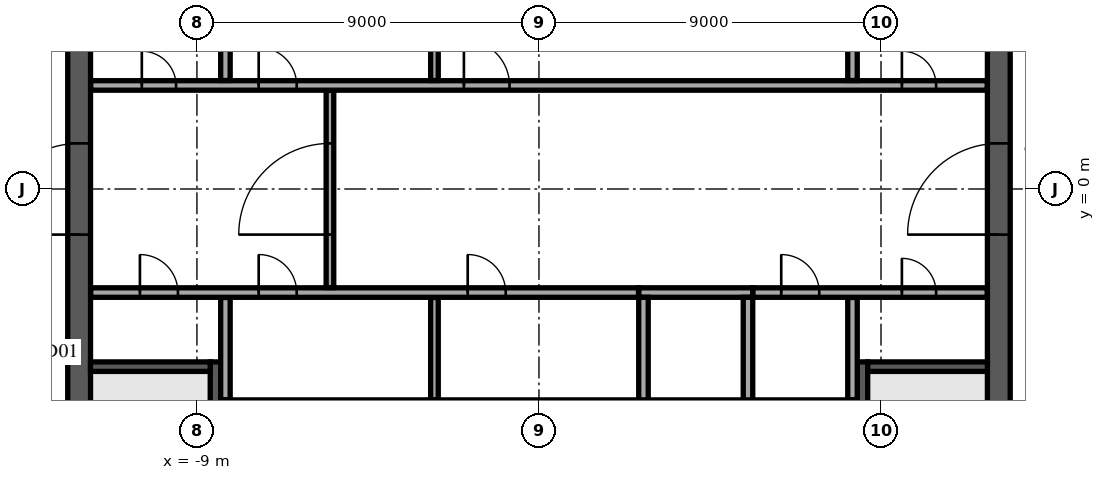
"""IFC4 building model, lengths in metres.
Left out: names, types, materials, properties, quantities, classifications, styles, units other than length and angle.
Written with IfcOpenShell. Run it as: python <this file> out.ifc"""

import sys

from ifc_helpers import new_model, si_unit, direction, frame, frame_2d, origin, place, context, subcontext, project, spatial, rectangle, extrude, element, fill, save


model = new_model("IFC4")
c1 = context("Model", 3, precision=1e-05, world=origin(), true_north=direction((0.0, 1.0)))
c2 = subcontext(c1, "Body", "Model", "MODEL_VIEW")
j1 = project(units=[si_unit("LENGTHUNIT", "METRE"), si_unit("PLANEANGLEUNIT", "RADIAN")], contexts=[c1])
p1 = place(None, origin())
s1 = spatial("IfcSite", under=j1, at=p1, CompositionType="ELEMENT")
p2 = place(p1, origin())
s2 = spatial("IfcBuilding", under=s1, at=p2, CompositionType="ELEMENT")
p3 = place(p2, frame((0.0, 0.0, 300.5)))
s3 = spatial("IfcBuildingStorey", under=s2, at=p3, CompositionType="ELEMENT", Elevation=300.5)
p4 = place(p3, frame((12.1, -11.8, 0.0), z_axis=(0.0, 0.0, 1.0), x_axis=(0.0, 1.0, 0.0)))
e1 = element("IfcWall", 1, at=p4, inside=s3, PredefinedType="SHEAR", context=c2, shape_type="SweptSolid", body=[
    extrude(rectangle(XDim=23.6, YDim=0.6, at=frame_2d((11.8, 0.0))), origin(), (0.0, 0.0, 1.0), 3.65),
])
p5 = place(p4, frame((10.6, 0.0, 0.0)))
e2 = element("IfcOpeningElement", 2, at=p5, cuts=e1, PredefinedType="OPENING", context=c2, shape_type="SweptSolid", body=[
    extrude(rectangle(XDim=2.4, YDim=2.4, at=frame_2d((1.2, 1.2))), frame((0.0, 0.31, 0.0), z_axis=(0.0, -1.0, 0.0), x_axis=(1.0, 0.0, 0.0)), (0.0, 0.0, 1.0), 0.62),
])
p6 = place(p3, frame((-12.1, -11.8, 0.0), z_axis=(0.0, 0.0, 1.0), x_axis=(0.0, 1.0, 0.0)))
e3 = element("IfcWall", 3, at=p6, inside=s3, PredefinedType="SHEAR", context=c2, shape_type="SweptSolid", body=[
    extrude(rectangle(XDim=23.6, YDim=0.6, at=frame_2d((11.8, 0.0))), origin(), (0.0, 0.0, 1.0), 3.65),
])
p7 = place(p6, frame((10.6, 0.0, 0.0)))
e4 = element("IfcOpeningElement", 4, at=p7, cuts=e3, PredefinedType="OPENING", context=c2, shape_type="SweptSolid", body=[
    extrude(rectangle(XDim=2.4, YDim=2.4, at=frame_2d((1.2, 1.2))), frame((0.0, 0.31, 0.0), z_axis=(0.0, -1.0, 0.0), x_axis=(1.0, 0.0, 0.0)), (0.0, 0.0, 1.0), 0.62),
])
p8 = place(p3, frame((-2.875, -5.7, 0.0), z_axis=(0.0, 0.0, 1.0), x_axis=(1.0, 0.0, 0.0)))
e5 = element("IfcWall", 5, at=p8, inside=s3, PredefinedType="SOLIDWALL", context=c2, shape_type="SweptSolid", body=[
    extrude(rectangle(XDim=11.25, YDim=0.3, at=frame_2d((5.625, 0.0))), origin(), (0.0, 0.0, 1.0), 3.65),
])
p9 = place(p3, frame((2.625, -2.725, 0.0), z_axis=(0.0, 0.0, 1.0), x_axis=(1.0, 0.0, 0.0)))
e6 = element("IfcWall", 6, at=p9, inside=s3, PredefinedType="SOLIDWALL", context=c2, shape_type="SweptSolid", body=[
    extrude(rectangle(XDim=3.0, YDim=0.25, at=frame_2d((1.5, 0.0))), origin(), (0.0, 0.0, 1.0), 3.65),
])
for number, where, z_axis, x_axis in (
    (7, (2.75, -5.55, 0.0), (0.0, 0.0, 1.0), (0.0, 1.0, 0.0)),
    (8, (5.5, -5.55, 0.0), (0.0, 0.0, 1.0), (0.0, 1.0, 0.0)),
):
    element("IfcWall", number, at=place(p3, frame(where, z_axis=z_axis, x_axis=x_axis)), inside=s3, PredefinedType="SOLIDWALL", context=c2, shape_type="SweptSolid", body=[
        extrude(rectangle(XDim=2.7, YDim=0.25, at=frame_2d((1.35, 0.0))), origin(), (0.0, 0.0, 1.0), 3.65),
    ])
p10 = place(p3, frame((-8.512, -4.55, 0.0), z_axis=(0.0, 0.0, 1.0), x_axis=(0.0, -1.0, 0.0)))
e9 = element("IfcWall", 9, at=p10, inside=s3, PredefinedType="SOLIDWALL", context=c2, shape_type="SweptSolid", body=[
    extrude(rectangle(XDim=7.25, YDim=0.275, at=frame_2d((3.625, 0.0))), origin(), (0.0, 0.0, 1.0), 3.65),
])
p11 = place(p10, frame((6.0, 0.0, 0.0)))
e10 = element("IfcOpeningElement", 10, at=p11, cuts=e9, PredefinedType="OPENING", context=c2, shape_type="SweptSolid", body=[
    extrude(rectangle(XDim=1.0, YDim=2.1, at=frame_2d((0.5, 1.05))), frame((0.0, 0.147, 0.0), z_axis=(0.0, -1.0, 0.0), x_axis=(1.0, 0.0, 0.0)), (0.0, 0.0, 1.0), 0.295),
])
p12 = place(p3, frame((-8.65, -4.675, 0.0), z_axis=(0.0, 0.0, 1.0), x_axis=(-1.0, 0.0, 0.0)))
e11 = element("IfcWall", 11, at=p12, inside=s3, PredefinedType="SOLIDWALL", context=c2, shape_type="SweptSolid", body=[
    extrude(rectangle(XDim=3.15, YDim=0.25, at=frame_2d((1.575, 0.0))), origin(), (0.0, 0.0, 1.0), 3.65),
])
p13 = place(p3, frame((8.512, -4.55, 0.0), z_axis=(0.0, 0.0, 1.0), x_axis=(0.0, -1.0, 0.0)))
e12 = element("IfcWall", 12, at=p13, inside=s3, PredefinedType="SOLIDWALL", context=c2, shape_type="SweptSolid", body=[
    extrude(rectangle(XDim=7.25, YDim=0.275, at=frame_2d((3.625, 0.0))), origin(), (0.0, 0.0, 1.0), 3.65),
])
p14 = place(p13, frame((6.0, 0.0, 0.0)))
e13 = element("IfcOpeningElement", 13, at=p14, cuts=e12, PredefinedType="OPENING", context=c2, shape_type="SweptSolid", body=[
    extrude(rectangle(XDim=1.0, YDim=2.1, at=frame_2d((0.5, 1.05))), frame((0.0, 0.147, 0.0), z_axis=(0.0, -1.0, 0.0), x_axis=(1.0, 0.0, 0.0)), (0.0, 0.0, 1.0), 0.295),
])
p15 = place(p3, frame((8.65, -4.675, 0.0), z_axis=(0.0, 0.0, 1.0), x_axis=(1.0, 0.0, 0.0)))
e14 = element("IfcWall", 14, at=p15, inside=s3, PredefinedType="SOLIDWALL", context=c2, shape_type="SweptSolid", body=[
    extrude(rectangle(XDim=3.15, YDim=0.25, at=frame_2d((1.575, 0.0))), origin(), (0.0, 0.0, 1.0), 3.65),
])
p16 = place(p3, frame((-8.35, -5.7, 0.0), z_axis=(0.0, 0.0, 1.0), x_axis=(1.0, 0.0, 0.0)))
e15 = element("IfcWall", 15, at=p16, inside=s3, PredefinedType="PARTITIONING", context=c2, shape_type="SweptSolid", body=[
    extrude(rectangle(XDim=5.47, YDim=0.3, at=frame_2d((2.735, 0.0))), origin(), (0.0, 0.0, 1.0), 3.65),
])
p17 = place(p3, frame((-8.25, -5.545, 0.0), z_axis=(0.0, 0.0, 1.0), x_axis=(0.0, 1.0, 0.0)))
e16 = element("IfcWall", 16, at=p17, inside=s3, PredefinedType="PARTITIONING", context=c2, shape_type="SweptSolid", body=[
    extrude(rectangle(XDim=2.69, YDim=0.25, at=frame_2d((1.345, 0.0))), origin(), (0.0, 0.0, 1.0), 3.65),
])
p18 = place(p3, frame((-2.75, -5.545, 0.0), z_axis=(0.0, 0.0, 1.0), x_axis=(0.0, 1.0, 0.0)))
e17 = element("IfcWall", 17, at=p18, inside=s3, PredefinedType="PARTITIONING", context=c2, shape_type="SweptSolid", body=[
    extrude(rectangle(XDim=2.69, YDim=0.2, at=frame_2d((1.345, 0.0))), origin(), (0.0, 0.0, 1.0), 3.65),
])
p19 = place(p3, frame((8.25, -5.545, 0.0), z_axis=(0.0, 0.0, 1.0), x_axis=(0.0, 1.0, 0.0)))
e18 = element("IfcWall", 18, at=p19, inside=s3, PredefinedType="PARTITIONING", context=c2, shape_type="SweptSolid", body=[
    extrude(rectangle(XDim=2.69, YDim=0.25, at=frame_2d((1.345, 0.0))), origin(), (0.0, 0.0, 1.0), 3.65),
])
p20 = place(p3, frame((-11.795, -2.725, 0.0), z_axis=(0.0, 0.0, 1.0), x_axis=(1.0, 0.0, 0.0)))
e19 = element("IfcWall", 19, at=p20, inside=s3, PredefinedType="PARTITIONING", context=c2, shape_type="SweptSolid", body=[
    extrude(rectangle(XDim=14.415, YDim=0.25, at=frame_2d((7.208, 0.0))), origin(), (0.0, 0.0, 1.0), 3.65),
])
p21 = place(p20, frame((1.295, 0.0, 0.0)))
e20 = element("IfcOpeningElement", 20, at=p21, cuts=e19, PredefinedType="OPENING", context=c2, shape_type="SweptSolid", body=[
    extrude(rectangle(XDim=1.0, YDim=2.1, at=frame_2d((0.5, 1.05))), frame((0.0, 0.135, 0.0), z_axis=(0.0, -1.0, 0.0), x_axis=(1.0, 0.0, 0.0)), (0.0, 0.0, 1.0), 0.27),
])
p22 = place(p20, frame((4.42, 0.0, 0.0)))
e21 = element("IfcOpeningElement", 21, at=p22, cuts=e19, PredefinedType="OPENING", context=c2, shape_type="SweptSolid", body=[
    extrude(rectangle(XDim=1.0, YDim=2.1, at=frame_2d((0.5, 1.05))), frame((0.0, 0.135, 0.0), z_axis=(0.0, -1.0, 0.0), x_axis=(1.0, 0.0, 0.0)), (0.0, 0.0, 1.0), 0.27),
])
p23 = place(p20, frame((9.92, 0.0, 0.0)))
e22 = element("IfcOpeningElement", 22, at=p23, cuts=e19, PredefinedType="OPENING", context=c2, shape_type="SweptSolid", body=[
    extrude(rectangle(XDim=1.0, YDim=2.1, at=frame_2d((0.5, 1.05))), frame((0.0, 0.135, 0.0), z_axis=(0.0, -1.0, 0.0), x_axis=(1.0, 0.0, 0.0)), (0.0, 0.0, 1.0), 0.27),
])
p24 = place(p3, frame((5.63, -2.725, 0.0), z_axis=(0.0, 0.0, 1.0), x_axis=(1.0, 0.0, 0.0)))
e23 = element("IfcWall", 23, at=p24, inside=s3, PredefinedType="PARTITIONING", context=c2, shape_type="SweptSolid", body=[
    extrude(rectangle(XDim=6.165, YDim=0.25, at=frame_2d((3.083, 0.0))), origin(), (0.0, 0.0, 1.0), 3.65),
])
p25 = place(p24, frame((0.745, 0.0, 0.0)))
e24 = element("IfcOpeningElement", 24, at=p25, cuts=e23, PredefinedType="OPENING", context=c2, shape_type="SweptSolid", body=[
    extrude(rectangle(XDim=1.0, YDim=2.1, at=frame_2d((0.5, 1.05))), frame((0.0, 0.135, 0.0), z_axis=(0.0, -1.0, 0.0), x_axis=(1.0, 0.0, 0.0)), (0.0, 0.0, 1.0), 0.27),
])
p26 = place(p24, frame((3.92, 0.0, 0.0)))
e25 = element("IfcOpeningElement", 25, at=p26, cuts=e23, PredefinedType="OPENING", context=c2, shape_type="SweptSolid", body=[
    extrude(rectangle(XDim=0.9, YDim=2.1, at=frame_2d((0.45, 1.05))), frame((0.0, 0.135, 0.0), z_axis=(0.0, -1.0, 0.0), x_axis=(1.0, 0.0, 0.0)), (0.0, 0.0, 1.0), 0.27),
])
p27 = place(p3, frame((-5.5, -2.595, 0.0), z_axis=(0.0, 0.0, 1.0), x_axis=(0.0, 1.0, 0.0)))
e26 = element("IfcWall", 26, at=p27, inside=s3, PredefinedType="PARTITIONING", context=c2, shape_type="SweptSolid", body=[
    extrude(rectangle(XDim=5.19, YDim=0.2, at=frame_2d((2.595, 0.0))), origin(), (0.0, 0.0, 1.0), 3.65),
])
p28 = place(p27, frame((1.395, 0.0, 0.0)))
e27 = element("IfcOpeningElement", 27, at=p28, cuts=e26, PredefinedType="OPENING", context=c2, shape_type="SweptSolid", body=[
    extrude(rectangle(XDim=2.4, YDim=2.4, at=frame_2d((1.2, 1.2))), frame((0.0, 0.11, 0.0), z_axis=(0.0, -1.0, 0.0), x_axis=(1.0, 0.0, 0.0)), (0.0, 0.0, 1.0), 0.22),
])
p29 = place(p3, frame((-11.795, 2.725, 0.0), z_axis=(0.0, 0.0, 1.0), x_axis=(1.0, 0.0, 0.0)))
e28 = element("IfcWall", 28, at=p29, inside=s3, PredefinedType="PARTITIONING", context=c2, shape_type="SweptSolid", body=[
    extrude(rectangle(XDim=23.59, YDim=0.25, at=frame_2d((11.795, 0.0))), origin(), (0.0, 0.0, 1.0), 3.65),
])
p30 = place(p29, frame((21.345, 0.0, 0.0)))
e29 = element("IfcOpeningElement", 29, at=p30, cuts=e28, PredefinedType="OPENING", context=c2, shape_type="SweptSolid", body=[
    extrude(rectangle(XDim=0.9, YDim=2.1, at=frame_2d((0.45, 1.05))), frame((0.0, 0.135, 0.0), z_axis=(0.0, -1.0, 0.0), x_axis=(1.0, 0.0, 0.0)), (0.0, 0.0, 1.0), 0.27),
])
p31 = place(p29, frame((1.345, 0.0, 0.0)))
e30 = element("IfcOpeningElement", 30, at=p31, cuts=e28, PredefinedType="OPENING", context=c2, shape_type="SweptSolid", body=[
    extrude(rectangle(XDim=0.9, YDim=2.1, at=frame_2d((0.45, 1.05))), frame((0.0, 0.135, 0.0), z_axis=(0.0, -1.0, 0.0), x_axis=(1.0, 0.0, 0.0)), (0.0, 0.0, 1.0), 0.27),
])
p32 = place(p29, frame((4.42, 0.0, 0.0)))
e31 = element("IfcOpeningElement", 31, at=p32, cuts=e28, PredefinedType="OPENING", context=c2, shape_type="SweptSolid", body=[
    extrude(rectangle(XDim=1.0, YDim=2.1, at=frame_2d((0.5, 1.05))), frame((0.0, 0.135, 0.0), z_axis=(0.0, -1.0, 0.0), x_axis=(1.0, 0.0, 0.0)), (0.0, 0.0, 1.0), 0.27),
])
p33 = place(p29, frame((9.82, 0.0, 0.0)))
e32 = element("IfcOpeningElement", 32, at=p33, cuts=e28, PredefinedType="OPENING", context=c2, shape_type="SweptSolid", body=[
    extrude(rectangle(XDim=1.2, YDim=2.1, at=frame_2d((0.6, 1.05))), frame((0.0, 0.135, 0.0), z_axis=(0.0, -1.0, 0.0), x_axis=(1.0, 0.0, 0.0)), (0.0, 0.0, 1.0), 0.27),
])
p34 = place(p3, frame((-8.25, 2.855, 0.0), z_axis=(0.0, 0.0, 1.0), x_axis=(0.0, 1.0, 0.0)))
e33 = element("IfcWall", 33, at=p34, inside=s3, PredefinedType="PARTITIONING", context=c2, shape_type="SweptSolid", body=[
    extrude(rectangle(XDim=1.715, YDim=0.25, at=frame_2d((0.857, 0.0))), origin(), (0.0, 0.0, 1.0), 3.65),
])
p35 = place(p3, frame((-2.75, 2.855, 0.0), z_axis=(0.0, 0.0, 1.0), x_axis=(0.0, 1.0, 0.0)))
e34 = element("IfcWall", 34, at=p35, inside=s3, PredefinedType="PARTITIONING", context=c2, shape_type="SweptSolid", body=[
    extrude(rectangle(XDim=2.69, YDim=0.2, at=frame_2d((1.345, 0.0))), origin(), (0.0, 0.0, 1.0), 3.65),
])
p36 = place(p3, frame((8.25, 2.855, 0.0), z_axis=(0.0, 0.0, 1.0), x_axis=(0.0, 1.0, 0.0)))
e35 = element("IfcWall", 35, at=p36, inside=s3, PredefinedType="PARTITIONING", context=c2, shape_type="SweptSolid", body=[
    extrude(rectangle(XDim=2.69, YDim=0.25, at=frame_2d((1.345, 0.0))), origin(), (0.0, 0.0, 1.0), 3.65),
])
p37 = place(p5, origin())
e36 = element("IfcDoor", 36, at=p37, inside=s3, OperationType="SINGLE_SWING_LEFT", PredefinedType="DOOR", context=c2, shape_type="SweptSolid", body=[
    extrude(rectangle(XDim=2.4, YDim=2.4, at=frame_2d((1.2, 1.2))), frame((0.0, 0.025, 0.0), z_axis=(0.0, -1.0, 0.0), x_axis=(1.0, 0.0, 0.0)), (0.0, 0.0, 1.0), 0.05),
])
fill(e2, e36)
p38 = place(p7, origin())
e37 = element("IfcDoor", 37, at=p38, inside=s3, OperationType="SINGLE_SWING_LEFT", PredefinedType="DOOR", context=c2, shape_type="SweptSolid", body=[
    extrude(rectangle(XDim=2.4, YDim=2.4, at=frame_2d((1.2, 1.2))), frame((0.0, 0.025, 0.0), z_axis=(0.0, -1.0, 0.0), x_axis=(1.0, 0.0, 0.0)), (0.0, 0.0, 1.0), 0.05),
])
fill(e4, e37)
p39 = place(p21, origin())
e38 = element("IfcDoor", 38, at=p39, inside=s3, OperationType="SINGLE_SWING_RIGHT", PredefinedType="DOOR", context=c2, shape_type="SweptSolid", body=[
    extrude(rectangle(XDim=1.0, YDim=2.1, at=frame_2d((0.5, 1.05))), frame((0.0, 0.025, 0.0), z_axis=(0.0, -1.0, 0.0), x_axis=(1.0, 0.0, 0.0)), (0.0, 0.0, 1.0), 0.05),
])
fill(e20, e38)
p40 = place(p25, origin())
e39 = element("IfcDoor", 39, at=p40, inside=s3, OperationType="SINGLE_SWING_RIGHT", PredefinedType="DOOR", context=c2, shape_type="SweptSolid", body=[
    extrude(rectangle(XDim=1.0, YDim=2.1, at=frame_2d((0.5, 1.05))), frame((0.0, 0.025, 0.0), z_axis=(0.0, -1.0, 0.0), x_axis=(1.0, 0.0, 0.0)), (0.0, 0.0, 1.0), 0.05),
])
fill(e24, e39)
p41 = place(p30, origin())
e40 = element("IfcDoor", 40, at=p41, inside=s3, OperationType="SINGLE_SWING_RIGHT", PredefinedType="DOOR", context=c2, shape_type="SweptSolid", body=[
    extrude(rectangle(XDim=0.9, YDim=2.1, at=frame_2d((0.45, 1.05))), frame((0.0, 0.025, 0.0), z_axis=(0.0, -1.0, 0.0), x_axis=(1.0, 0.0, 0.0)), (0.0, 0.0, 1.0), 0.05),
])
fill(e29, e40)
p42 = place(p26, origin())
e41 = element("IfcDoor", 41, at=p42, inside=s3, OperationType="SINGLE_SWING_RIGHT", PredefinedType="DOOR", context=c2, shape_type="SweptSolid", body=[
    extrude(rectangle(XDim=0.9, YDim=2.1, at=frame_2d((0.45, 1.05))), frame((0.0, 0.025, 0.0), z_axis=(0.0, -1.0, 0.0), x_axis=(1.0, 0.0, 0.0)), (0.0, 0.0, 1.0), 0.05),
])
fill(e25, e41)
p43 = place(p31, origin())
e42 = element("IfcDoor", 42, at=p43, inside=s3, OperationType="SINGLE_SWING_RIGHT", PredefinedType="DOOR", context=c2, shape_type="SweptSolid", body=[
    extrude(rectangle(XDim=0.9, YDim=2.1, at=frame_2d((0.45, 1.05))), frame((0.0, 0.025, 0.0), z_axis=(0.0, -1.0, 0.0), x_axis=(1.0, 0.0, 0.0)), (0.0, 0.0, 1.0), 0.05),
])
fill(e30, e42)
p44 = place(p32, origin())
e43 = element("IfcDoor", 43, at=p44, inside=s3, OperationType="SINGLE_SWING_RIGHT", PredefinedType="DOOR", context=c2, shape_type="SweptSolid", body=[
    extrude(rectangle(XDim=1.0, YDim=2.1, at=frame_2d((0.5, 1.05))), frame((0.0, 0.025, 0.0), z_axis=(0.0, -1.0, 0.0), x_axis=(1.0, 0.0, 0.0)), (0.0, 0.0, 1.0), 0.05),
])
fill(e31, e43)
p45 = place(p33, origin())
e44 = element("IfcDoor", 44, at=p45, inside=s3, OperationType="SINGLE_SWING_LEFT", PredefinedType="DOOR", context=c2, shape_type="SweptSolid", body=[
    extrude(rectangle(XDim=1.2, YDim=2.1, at=frame_2d((0.6, 1.05))), frame((0.0, 0.025, 0.0), z_axis=(0.0, -1.0, 0.0), x_axis=(1.0, 0.0, 0.0)), (0.0, 0.0, 1.0), 0.05),
])
fill(e32, e44)
p46 = place(p22, origin())
e45 = element("IfcDoor", 45, at=p46, inside=s3, OperationType="SINGLE_SWING_RIGHT", PredefinedType="DOOR", context=c2, shape_type="SweptSolid", body=[
    extrude(rectangle(XDim=1.0, YDim=2.1, at=frame_2d((0.5, 1.05))), frame((0.0, 0.025, 0.0), z_axis=(0.0, -1.0, 0.0), x_axis=(1.0, 0.0, 0.0)), (0.0, 0.0, 1.0), 0.05),
])
fill(e21, e45)
p47 = place(p23, origin())
e46 = element("IfcDoor", 46, at=p47, inside=s3, OperationType="SINGLE_SWING_RIGHT", PredefinedType="DOOR", context=c2, shape_type="SweptSolid", body=[
    extrude(rectangle(XDim=1.0, YDim=2.1, at=frame_2d((0.5, 1.05))), frame((0.0, 0.025, 0.0), z_axis=(0.0, -1.0, 0.0), x_axis=(1.0, 0.0, 0.0)), (0.0, 0.0, 1.0), 0.05),
])
fill(e22, e46)
p48 = place(p28, origin())
e47 = element("IfcDoor", 47, at=p48, inside=s3, OperationType="DOUBLE_DOOR_DOUBLE_SWING", PredefinedType="DOOR", context=c2, shape_type="SweptSolid", body=[
    extrude(rectangle(XDim=2.4, YDim=2.4, at=frame_2d((1.2, 1.2))), frame((0.0, 0.025, 0.0), z_axis=(0.0, -1.0, 0.0), x_axis=(1.0, 0.0, 0.0)), (0.0, 0.0, 1.0), 0.05),
])
fill(e27, e47)
save(model, sys.argv[1])
